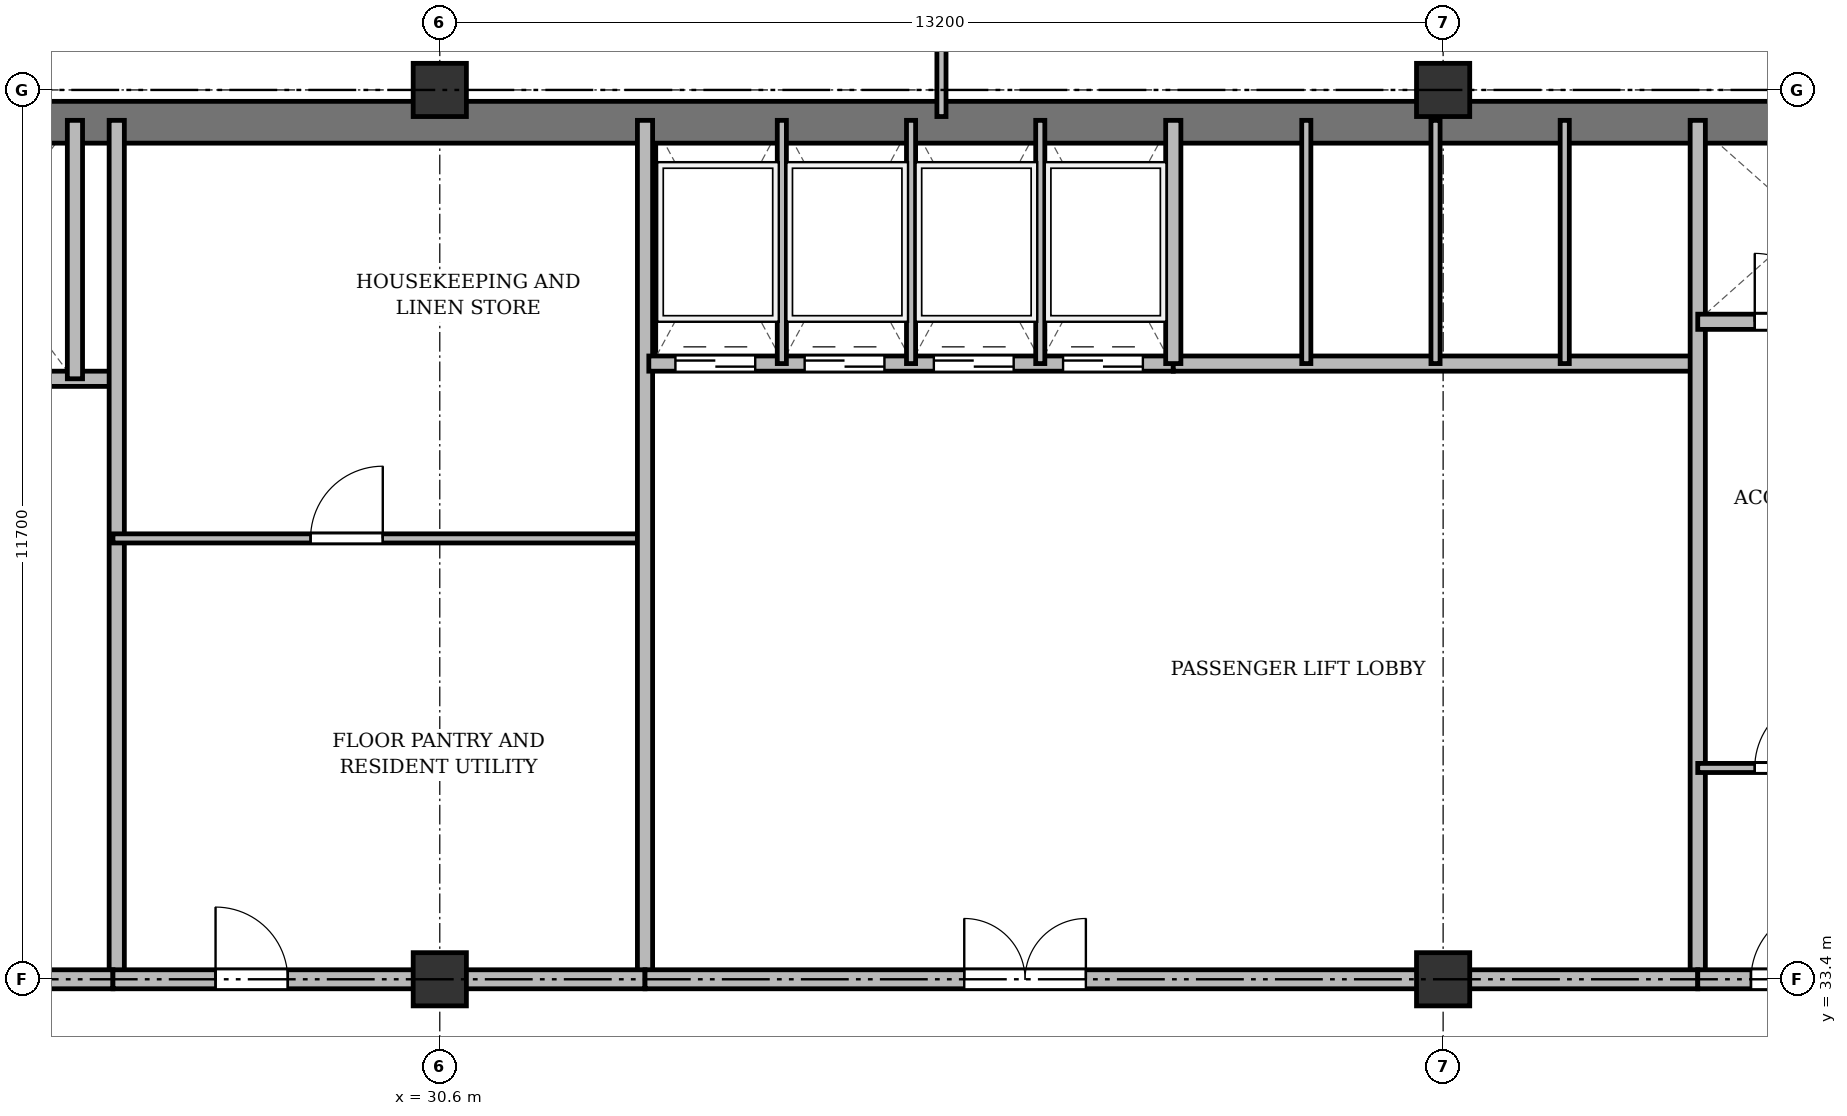
"""IFC4 building model, lengths in metres.
Left out: names, types, materials, properties, quantities, classifications, styles, units other than length and angle.
Written with IfcOpenShell. Run it as: python <this file> out.ifc"""

import sys

from ifc_helpers import new_model, si_unit, direction, frame, frame_2d, origin, origin_2d, place, context, subcontext, project, spatial, rectangle, extrude, source, transform, mapped, element, fill, save


model = new_model("IFC4")
c1 = context("Model", 3, precision=1e-05, world=origin(), true_north=direction((0.0, 1.0)))
c2 = subcontext(c1, "Body", "Model", "MODEL_VIEW")
j1 = project(units=[si_unit("LENGTHUNIT", "METRE"), si_unit("PLANEANGLEUNIT", "RADIAN")], contexts=[c1])
p1 = place(None, origin())
s1 = spatial("IfcSite", under=j1, at=p1, CompositionType="ELEMENT")
p2 = place(p1, origin())
s2 = spatial("IfcBuilding", under=s1, at=p2, CompositionType="ELEMENT")
p3 = place(p2, frame((0.0, 0.0, 168.1)))
s3 = spatial("IfcBuildingStorey", under=s2, at=p3, CompositionType="ELEMENT", Elevation=168.1)
m1 = source(origin(), c2, "Body", "SweptSolid", [
    extrude(rectangle(XDim=0.7, YDim=0.7, at=origin_2d()), origin(), (0.0, 0.0, 1.0), 3.6),
])
for number, where, z_axis, x_axis in (
    (1, (30.6, 33.4, 0.0), (0.0, 0.0, 1.0), (1.0, 0.0, 0.0)),
    (2, (30.6, 45.1, 0.0), (0.0, 0.0, 1.0), (1.0, 0.0, 0.0)),
    (3, (43.8, 33.4, 0.0), (0.0, 0.0, 1.0), (1.0, 0.0, 0.0)),
    (4, (43.8, 45.1, 0.0), (0.0, 0.0, 1.0), (1.0, 0.0, 0.0)),
):
    element("IfcColumn", number, at=place(p3, frame(where, z_axis=z_axis, x_axis=x_axis)), inside=s3, PredefinedType="COLUMN", context=c2, shape_type="MappedRepresentation", body=[
        mapped(m1, transform((0.0, 0.0, 0.0), x_axis=(1.0, 0.0, 0.0), y_axis=(0.0, 1.0, 0.0), z_axis=(0.0, 0.0, 1.0), scale=1.0)),
    ])
p4 = place(p3, frame((15.65, 44.675, 0.0), z_axis=(0.0, 0.0, 1.0), x_axis=(1.0, 0.0, 0.0)))
e5 = element("IfcWall", 5, at=p4, inside=s3, PredefinedType="SHEAR", context=c2, shape_type="SweptSolid", body=[
    extrude(rectangle(XDim=43.1, YDim=0.55, at=frame_2d((21.55, 0.0))), origin(), (0.0, 0.0, 1.0), 3.35),
])
p5 = place(p3, frame((19.55, 41.3, 0.0), z_axis=(0.0, 0.0, 1.0), x_axis=(1.0, 0.0, 0.0)))
e6 = element("IfcWall", 6, at=p5, inside=s3, PredefinedType="SOLIDWALL", context=c2, shape_type="SweptSolid", body=[
    extrude(rectangle(XDim=6.75, YDim=0.2, at=frame_2d((3.375, 0.0))), origin(), (0.0, 0.0, 1.0), 3.35),
])
p6 = place(p5, frame((1.7, 0.0, 0.0)))
e7 = element("IfcOpeningElement", 7, at=p6, cuts=e6, PredefinedType="OPENING", context=c2, shape_type="SweptSolid", body=[
    extrude(rectangle(XDim=1.1, YDim=2.15, at=frame_2d((0.55, 1.075))), frame((0.0, 0.11, 0.0), z_axis=(0.0, -1.0, 0.0), x_axis=(1.0, 0.0, 0.0)), (0.0, 0.0, 1.0), 0.22),
])
p7 = place(p5, frame((4.4, 0.0, 0.0)))
e8 = element("IfcOpeningElement", 8, at=p7, cuts=e6, PredefinedType="OPENING", context=c2, shape_type="SweptSolid", body=[
    extrude(rectangle(XDim=1.1, YDim=2.15, at=frame_2d((0.55, 1.075))), frame((0.0, 0.11, 0.0), z_axis=(0.0, -1.0, 0.0), x_axis=(1.0, 0.0, 0.0)), (0.0, 0.0, 1.0), 0.22),
])
p8 = place(p3, frame((25.8, 41.3, 0.0), z_axis=(0.0, 0.0, 1.0), x_axis=(0.0, 1.0, 0.0)))
e9 = element("IfcWall", 9, at=p8, inside=s3, PredefinedType="SOLIDWALL", context=c2, shape_type="SweptSolid", body=[
    extrude(rectangle(XDim=3.4, YDim=0.2, at=frame_2d((1.7, 0.0))), origin(), (0.0, 0.0, 1.0), 3.35),
])
p9 = place(p3, frame((26.35, 33.4, 0.0), z_axis=(0.0, 0.0, 1.0), x_axis=(0.0, 1.0, 0.0)))
e10 = element("IfcWall", 10, at=p9, inside=s3, PredefinedType="SOLIDWALL", context=c2, shape_type="SweptSolid", body=[
    extrude(rectangle(XDim=11.3, YDim=0.2, at=frame_2d((5.65, 0.0))), origin(), (0.0, 0.0, 1.0), 2.75),
])
p10 = place(p3, frame((19.5, 33.4, 0.0), z_axis=(0.0, 0.0, 1.0), x_axis=(1.0, 0.0, 0.0)))
e11 = element("IfcWall", 11, at=p10, inside=s3, PredefinedType="PARTITIONING", context=c2, shape_type="SweptSolid", body=[
    extrude(rectangle(XDim=6.8, YDim=0.25, at=frame_2d((3.4, 0.0))), origin(), (0.0, 0.0, 1.0), 2.75),
])
p11 = place(p10, frame((0.75, 0.0, 0.0)))
e12 = element("IfcOpeningElement", 12, at=p11, cuts=e11, PredefinedType="OPENING", context=c2, shape_type="SweptSolid", body=[
    extrude(rectangle(XDim=1.6, YDim=2.2, at=frame_2d((0.8, 1.1))), frame((0.0, 0.135, 0.0), z_axis=(0.0, -1.0, 0.0), x_axis=(1.0, 0.0, 0.0)), (0.0, 0.0, 1.0), 0.27),
])
p12 = place(p3, frame((26.3, 39.2, 0.0), z_axis=(0.0, 0.0, 1.0), x_axis=(1.0, 0.0, 0.0)))
e13 = element("IfcWall", 13, at=p12, inside=s3, PredefinedType="PARTITIONING", context=c2, shape_type="SweptSolid", body=[
    extrude(rectangle(XDim=7.0, YDim=0.12, at=frame_2d((3.5, 0.0))), origin(), (0.0, 0.0, 1.0), 2.85),
])
p13 = place(p12, frame((2.6, 0.0, 0.0)))
e14 = element("IfcOpeningElement", 14, at=p13, cuts=e13, PredefinedType="OPENING", context=c2, shape_type="SweptSolid", body=[
    extrude(rectangle(XDim=0.95, YDim=2.15, at=frame_2d((0.475, 1.075))), frame((0.0, 0.07, 0.0), z_axis=(0.0, -1.0, 0.0), x_axis=(1.0, 0.0, 0.0)), (0.0, 0.0, 1.0), 0.14),
])
p14 = place(p3, frame((33.3, 33.4, 0.0), z_axis=(0.0, 0.0, 1.0), x_axis=(0.0, 1.0, 0.0)))
e15 = element("IfcWall", 15, at=p14, inside=s3, PredefinedType="SOLIDWALL", context=c2, shape_type="SweptSolid", body=[
    extrude(rectangle(XDim=11.3, YDim=0.2, at=frame_2d((5.65, 0.0))), origin(), (0.0, 0.0, 1.0), 2.75),
])
p15 = place(p3, frame((33.35, 41.5, 0.0), z_axis=(0.0, 0.0, 1.0), x_axis=(1.0, 0.0, 0.0)))
e16 = element("IfcWall", 16, at=p15, inside=s3, PredefinedType="SOLIDWALL", context=c2, shape_type="SweptSolid", body=[
    extrude(rectangle(XDim=6.9, YDim=0.2, at=frame_2d((3.45, 0.0))), origin(), (0.0, 0.0, 1.0), 3.35),
])
p16 = place(p15, frame((0.35, 0.0, 0.0)))
e17 = element("IfcOpeningElement", 17, at=p16, cuts=e16, PredefinedType="OPENING", context=c2, shape_type="SweptSolid", body=[
    extrude(rectangle(XDim=1.05, YDim=2.15, at=frame_2d((0.525, 1.075))), frame((0.0, 0.11, 0.0), z_axis=(0.0, -1.0, 0.0), x_axis=(1.0, 0.0, 0.0)), (0.0, 0.0, 1.0), 0.22),
])
p17 = place(p15, frame((2.05, 0.0, 0.0)))
e18 = element("IfcOpeningElement", 18, at=p17, cuts=e16, PredefinedType="OPENING", context=c2, shape_type="SweptSolid", body=[
    extrude(rectangle(XDim=1.05, YDim=2.15, at=frame_2d((0.525, 1.075))), frame((0.0, 0.11, 0.0), z_axis=(0.0, -1.0, 0.0), x_axis=(1.0, 0.0, 0.0)), (0.0, 0.0, 1.0), 0.22),
])
p18 = place(p15, frame((3.75, 0.0, 0.0)))
e19 = element("IfcOpeningElement", 19, at=p18, cuts=e16, PredefinedType="OPENING", context=c2, shape_type="SweptSolid", body=[
    extrude(rectangle(XDim=1.05, YDim=2.15, at=frame_2d((0.525, 1.075))), frame((0.0, 0.11, 0.0), z_axis=(0.0, -1.0, 0.0), x_axis=(1.0, 0.0, 0.0)), (0.0, 0.0, 1.0), 0.22),
])
p19 = place(p15, frame((5.45, 0.0, 0.0)))
e20 = element("IfcOpeningElement", 20, at=p19, cuts=e16, PredefinedType="OPENING", context=c2, shape_type="SweptSolid", body=[
    extrude(rectangle(XDim=1.05, YDim=2.15, at=frame_2d((0.525, 1.075))), frame((0.0, 0.11, 0.0), z_axis=(0.0, -1.0, 0.0), x_axis=(1.0, 0.0, 0.0)), (0.0, 0.0, 1.0), 0.22),
])
for number, where, z_axis, x_axis in (
    (21, (35.1, 41.5, 0.0), (0.0, 0.0, 1.0), (0.0, 1.0, 0.0)),
    (22, (36.8, 41.5, 0.0), (0.0, 0.0, 1.0), (0.0, 1.0, 0.0)),
    (23, (38.5, 41.5, 0.0), (0.0, 0.0, 1.0), (0.0, 1.0, 0.0)),
):
    element("IfcWall", number, at=place(p3, frame(where, z_axis=z_axis, x_axis=x_axis)), inside=s3, PredefinedType="PARTITIONING", context=c2, shape_type="SweptSolid", body=[
        extrude(rectangle(XDim=3.2, YDim=0.12, at=frame_2d((1.6, 0.0))), origin(), (0.0, 0.0, 1.0), 3.35),
    ])
p20 = place(p3, frame((40.25, 41.5, 0.0), z_axis=(0.0, 0.0, 1.0), x_axis=(1.0, 0.0, 0.0)))
e24 = element("IfcWall", 24, at=p20, inside=s3, PredefinedType="SOLIDWALL", context=c2, shape_type="SweptSolid", body=[
    extrude(rectangle(XDim=6.9, YDim=0.2, at=frame_2d((3.45, 0.0))), origin(), (0.0, 0.0, 1.0), 2.85),
])
p21 = place(p3, frame((40.25, 41.5, 0.0), z_axis=(0.0, 0.0, 1.0), x_axis=(0.0, 1.0, 0.0)))
e25 = element("IfcWall", 25, at=p21, inside=s3, PredefinedType="SOLIDWALL", context=c2, shape_type="SweptSolid", body=[
    extrude(rectangle(XDim=3.2, YDim=0.2, at=frame_2d((1.6, 0.0))), origin(), (0.0, 0.0, 1.0), 3.35),
])
p22 = place(p3, frame((42.0, 41.5, 0.0), z_axis=(0.0, 0.0, 1.0), x_axis=(0.0, 1.0, 0.0)))
e26 = element("IfcWall", 26, at=p22, inside=s3, PredefinedType="PARTITIONING", context=c2, shape_type="SweptSolid", body=[
    extrude(rectangle(XDim=3.2, YDim=0.12, at=frame_2d((1.6, 0.0))), origin(), (0.0, 0.0, 1.0), 3.35),
])
p23 = place(p3, frame((43.7, 41.5, 0.0), z_axis=(0.0, 0.0, 1.0), x_axis=(0.0, 1.0, 0.0)))
e27 = element("IfcWall", 27, at=p23, inside=s3, PredefinedType="PARTITIONING", context=c2, shape_type="SweptSolid", body=[
    extrude(rectangle(XDim=3.2, YDim=0.12, at=frame_2d((1.6, 0.0))), origin(), (0.0, 0.0, 1.0), 2.85),
])
p24 = place(p3, frame((45.4, 41.5, 0.0), z_axis=(0.0, 0.0, 1.0), x_axis=(0.0, 1.0, 0.0)))
e28 = element("IfcWall", 28, at=p24, inside=s3, PredefinedType="PARTITIONING", context=c2, shape_type="SweptSolid", body=[
    extrude(rectangle(XDim=3.2, YDim=0.12, at=frame_2d((1.6, 0.0))), origin(), (0.0, 0.0, 1.0), 3.35),
])
p25 = place(p3, frame((47.15, 33.4, 0.0), z_axis=(0.0, 0.0, 1.0), x_axis=(0.0, 1.0, 0.0)))
e29 = element("IfcWall", 29, at=p25, inside=s3, PredefinedType="SOLIDWALL", context=c2, shape_type="SweptSolid", body=[
    extrude(rectangle(XDim=11.3, YDim=0.2, at=frame_2d((5.65, 0.0))), origin(), (0.0, 0.0, 1.0), 2.75),
])
p26 = place(p3, frame((26.3, 33.4, 0.0), z_axis=(0.0, 0.0, 1.0), x_axis=(1.0, 0.0, 0.0)))
e30 = element("IfcWall", 30, at=p26, inside=s3, PredefinedType="PARTITIONING", context=c2, shape_type="SweptSolid", body=[
    extrude(rectangle(XDim=7.0, YDim=0.25, at=frame_2d((3.5, 0.0))), origin(), (0.0, 0.0, 1.0), 2.75),
])
p27 = place(p26, frame((1.35, 0.0, 0.0)))
e31 = element("IfcOpeningElement", 31, at=p27, cuts=e30, PredefinedType="OPENING", context=c2, shape_type="SweptSolid", body=[
    extrude(rectangle(XDim=0.95, YDim=2.15, at=frame_2d((0.475, 1.075))), frame((0.0, 0.135, 0.0), z_axis=(0.0, -1.0, 0.0), x_axis=(1.0, 0.0, 0.0)), (0.0, 0.0, 1.0), 0.27),
])
p28 = place(p3, frame((33.3, 33.4, 0.0), z_axis=(0.0, 0.0, 1.0), x_axis=(1.0, 0.0, 0.0)))
e32 = element("IfcWall", 32, at=p28, inside=s3, PredefinedType="PARTITIONING", context=c2, shape_type="SweptSolid", body=[
    extrude(rectangle(XDim=13.85, YDim=0.25, at=frame_2d((6.925, 0.0))), origin(), (0.0, 0.0, 1.0), 2.75),
])
p29 = place(p28, frame((4.2, 0.0, 0.0)))
e33 = element("IfcOpeningElement", 33, at=p29, cuts=e32, PredefinedType="OPENING", context=c2, shape_type="SweptSolid", body=[
    extrude(rectangle(XDim=1.6, YDim=2.2, at=frame_2d((0.8, 1.1))), frame((0.0, 0.135, 0.0), z_axis=(0.0, -1.0, 0.0), x_axis=(1.0, 0.0, 0.0)), (0.0, 0.0, 1.0), 0.27),
])
p30 = place(p3, frame((47.15, 42.05, 0.0), z_axis=(0.0, 0.0, 1.0), x_axis=(1.0, 0.0, 0.0)))
e34 = element("IfcWall", 34, at=p30, inside=s3, PredefinedType="SOLIDWALL", context=c2, shape_type="SweptSolid", body=[
    extrude(rectangle(XDim=7.85, YDim=0.2, at=frame_2d((3.925, 0.0))), origin(), (0.0, 0.0, 1.0), 2.85),
])
p31 = place(p30, frame((0.75, 0.0, 0.0)))
e35 = element("IfcOpeningElement", 35, at=p31, cuts=e34, PredefinedType="OPENING", context=c2, shape_type="SweptSolid", body=[
    extrude(rectangle(XDim=0.9, YDim=2.1, at=frame_2d((0.45, 1.05))), frame((0.0, 0.11, 0.0), z_axis=(0.0, -1.0, 0.0), x_axis=(1.0, 0.0, 0.0)), (0.0, 0.0, 1.0), 0.22),
])
p32 = place(p30, frame((3.85, 0.0, 0.0)))
e36 = element("IfcOpeningElement", 36, at=p32, cuts=e34, PredefinedType="OPENING", context=c2, shape_type="SweptSolid", body=[
    extrude(rectangle(XDim=0.9, YDim=2.1, at=frame_2d((0.45, 1.05))), frame((0.0, 0.11, 0.0), z_axis=(0.0, -1.0, 0.0), x_axis=(1.0, 0.0, 0.0)), (0.0, 0.0, 1.0), 0.22),
])
p33 = place(p3, frame((47.15, 36.18, 0.0), z_axis=(0.0, 0.0, 1.0), x_axis=(1.0, 0.0, 0.0)))
e37 = element("IfcWall", 37, at=p33, inside=s3, PredefinedType="PARTITIONING", context=c2, shape_type="SweptSolid", body=[
    extrude(rectangle(XDim=5.3, YDim=0.12, at=frame_2d((2.65, 0.0))), origin(), (0.0, 0.0, 1.0), 2.85),
])
p34 = place(p33, frame((0.75, 0.0, 0.0)))
e38 = element("IfcOpeningElement", 38, at=p34, cuts=e37, PredefinedType="OPENING", context=c2, shape_type="SweptSolid", body=[
    extrude(rectangle(XDim=0.95, YDim=2.15, at=frame_2d((0.475, 1.075))), frame((0.0, 0.07, 0.0), z_axis=(0.0, -1.0, 0.0), x_axis=(1.0, 0.0, 0.0)), (0.0, 0.0, 1.0), 0.14),
])
p35 = place(p33, frame((3.45, 0.0, 0.0)))
e39 = element("IfcOpeningElement", 39, at=p35, cuts=e37, PredefinedType="OPENING", context=c2, shape_type="SweptSolid", body=[
    extrude(rectangle(XDim=0.95, YDim=2.15, at=frame_2d((0.475, 1.075))), frame((0.0, 0.07, 0.0), z_axis=(0.0, -1.0, 0.0), x_axis=(1.0, 0.0, 0.0)), (0.0, 0.0, 1.0), 0.14),
])
p36 = place(p3, frame((47.15, 33.4, 0.0), z_axis=(0.0, 0.0, 1.0), x_axis=(1.0, 0.0, 0.0)))
e40 = element("IfcWall", 40, at=p36, inside=s3, PredefinedType="PARTITIONING", context=c2, shape_type="SweptSolid", body=[
    extrude(rectangle(XDim=11.15, YDim=0.25, at=frame_2d((5.575, 0.0))), origin(), (0.0, 0.0, 1.0), 2.75),
])
p37 = place(p36, frame((0.7, 0.0, 0.0)))
e41 = element("IfcOpeningElement", 41, at=p37, cuts=e40, PredefinedType="OPENING", context=c2, shape_type="SweptSolid", body=[
    extrude(rectangle(XDim=0.95, YDim=2.15, at=frame_2d((0.475, 1.075))), frame((0.0, 0.135, 0.0), z_axis=(0.0, -1.0, 0.0), x_axis=(1.0, 0.0, 0.0)), (0.0, 0.0, 1.0), 0.27),
])
p38 = place(p36, frame((6.0, 0.0, 0.0)))
e42 = element("IfcOpeningElement", 42, at=p38, cuts=e40, PredefinedType="OPENING", context=c2, shape_type="SweptSolid", body=[
    extrude(rectangle(XDim=1.2, YDim=2.15, at=frame_2d((0.6, 1.075))), frame((0.0, 0.135, 0.0), z_axis=(0.0, -1.0, 0.0), x_axis=(1.0, 0.0, 0.0)), (0.0, 0.0, 1.0), 0.27),
])
p39 = place(p3, frame((37.2, 44.75, 0.0), z_axis=(0.0, 0.0, 1.0), x_axis=(0.0, 1.0, 0.0)))
e43 = element("IfcWall", 43, at=p39, inside=s3, PredefinedType="PARTITIONING", context=c2, shape_type="SweptSolid", body=[
    extrude(rectangle(XDim=3.61, YDim=0.12, at=frame_2d((1.805, 0.0))), origin(), (0.0, 0.0, 1.0), 2.75),
])
p40 = place(p39, frame((1.1, 0.0, 0.0)))
e44 = element("IfcOpeningElement", 44, at=p40, cuts=e43, PredefinedType="OPENING", context=c2, shape_type="SweptSolid", body=[
    extrude(rectangle(XDim=0.95, YDim=2.15, at=frame_2d((0.475, 1.075))), frame((0.0, 0.07, 0.0), z_axis=(0.0, -1.0, 0.0), x_axis=(1.0, 0.0, 0.0)), (0.0, 0.0, 1.0), 0.14),
])
m2 = source(origin(), c2, "Body", "SweptSolid", [
    extrude(rectangle(XDim=0.95, YDim=2.15, at=frame_2d((0.475, 1.075))), frame((0.0, 0.025, 0.0), z_axis=(0.0, -1.0, 0.0), x_axis=(1.0, 0.0, 0.0)), (0.0, 0.0, 1.0), 0.05),
])
p41 = place(p13, origin())
e45 = element("IfcDoor", 45, at=p41, inside=s3, OperationType="SINGLE_SWING_RIGHT", PredefinedType="DOOR", context=c2, shape_type="MappedRepresentation", body=[
    mapped(m2, transform((0.0, 0.0, 0.0), x_axis=(1.0, 0.0, 0.0), y_axis=(0.0, 1.0, 0.0), z_axis=(0.0, 0.0, 1.0), scale=1.0)),
])
fill(e14, e45)
m3 = source(origin(), c2, "Body", "SweptSolid", [
    extrude(rectangle(XDim=1.05, YDim=2.15, at=frame_2d((0.525, 1.075))), frame((0.0, 0.025, 0.0), z_axis=(0.0, -1.0, 0.0), x_axis=(1.0, 0.0, 0.0)), (0.0, 0.0, 1.0), 0.05),
])
p42 = place(p16, origin())
e46 = element("IfcDoor", 46, at=p42, inside=s3, OperationType="DOUBLE_DOOR_SLIDING", PredefinedType="DOOR", context=c2, shape_type="MappedRepresentation", body=[
    mapped(m3, transform((0.0, 0.0, 0.0), x_axis=(1.0, 0.0, 0.0), y_axis=(0.0, 1.0, 0.0), z_axis=(0.0, 0.0, 1.0), scale=1.0)),
])
fill(e17, e46)
p43 = place(p17, origin())
e47 = element("IfcDoor", 47, at=p43, inside=s3, OperationType="DOUBLE_DOOR_SLIDING", PredefinedType="DOOR", context=c2, shape_type="MappedRepresentation", body=[
    mapped(m3, transform((0.0, 0.0, 0.0), x_axis=(1.0, 0.0, 0.0), y_axis=(0.0, 1.0, 0.0), z_axis=(0.0, 0.0, 1.0), scale=1.0)),
])
fill(e18, e47)
p44 = place(p18, origin())
e48 = element("IfcDoor", 48, at=p44, inside=s3, OperationType="DOUBLE_DOOR_SLIDING", PredefinedType="DOOR", context=c2, shape_type="MappedRepresentation", body=[
    mapped(m3, transform((0.0, 0.0, 0.0), x_axis=(1.0, 0.0, 0.0), y_axis=(0.0, 1.0, 0.0), z_axis=(0.0, 0.0, 1.0), scale=1.0)),
])
fill(e19, e48)
p45 = place(p19, origin())
e49 = element("IfcDoor", 49, at=p45, inside=s3, OperationType="DOUBLE_DOOR_SLIDING", PredefinedType="DOOR", context=c2, shape_type="MappedRepresentation", body=[
    mapped(m3, transform((0.0, 0.0, 0.0), x_axis=(1.0, 0.0, 0.0), y_axis=(0.0, 1.0, 0.0), z_axis=(0.0, 0.0, 1.0), scale=1.0)),
])
fill(e20, e49)
p46 = place(p27, origin())
e50 = element("IfcDoor", 50, at=p46, inside=s3, OperationType="SINGLE_SWING_LEFT", PredefinedType="DOOR", context=c2, shape_type="MappedRepresentation", body=[
    mapped(m2, transform((0.0, 0.0, 0.0), x_axis=(1.0, 0.0, 0.0), y_axis=(0.0, 1.0, 0.0), z_axis=(0.0, 0.0, 1.0), scale=1.0)),
])
fill(e31, e50)
m4 = source(origin(), c2, "Body", "SweptSolid", [
    extrude(rectangle(XDim=1.6, YDim=2.2, at=frame_2d((0.8, 1.1))), frame((0.0, 0.025, 0.0), z_axis=(0.0, -1.0, 0.0), x_axis=(1.0, 0.0, 0.0)), (0.0, 0.0, 1.0), 0.05),
])
p47 = place(p29, origin())
e51 = element("IfcDoor", 51, at=p47, inside=s3, OperationType="DOUBLE_DOOR_SINGLE_SWING", PredefinedType="DOOR", context=c2, shape_type="MappedRepresentation", body=[
    mapped(m4, transform((0.0, 0.0, 0.0), x_axis=(1.0, 0.0, 0.0), y_axis=(0.0, 1.0, 0.0), z_axis=(0.0, 0.0, 1.0), scale=1.0)),
])
fill(e33, e51)
m5 = source(origin(), c2, "Body", "SweptSolid", [
    extrude(rectangle(XDim=0.9, YDim=2.1, at=frame_2d((0.45, 1.05))), frame((0.0, 0.025, 0.0), z_axis=(0.0, -1.0, 0.0), x_axis=(1.0, 0.0, 0.0)), (0.0, 0.0, 1.0), 0.05),
])
p48 = place(p31, origin())
e52 = element("IfcDoor", 52, at=p48, inside=s3, OperationType="SINGLE_SWING_LEFT", PredefinedType="DOOR", context=c2, shape_type="MappedRepresentation", body=[
    mapped(m5, transform((0.0, 0.0, 0.0), x_axis=(1.0, 0.0, 0.0), y_axis=(0.0, 1.0, 0.0), z_axis=(0.0, 0.0, 1.0), scale=1.0)),
])
fill(e35, e52)
p49 = place(p34, origin())
e53 = element("IfcDoor", 53, at=p49, inside=s3, OperationType="SINGLE_SWING_RIGHT", PredefinedType="DOOR", context=c2, shape_type="MappedRepresentation", body=[
    mapped(m2, transform((0.0, 0.0, 0.0), x_axis=(1.0, 0.0, 0.0), y_axis=(0.0, 1.0, 0.0), z_axis=(0.0, 0.0, 1.0), scale=1.0)),
])
fill(e38, e53)
p50 = place(p37, origin())
e54 = element("IfcDoor", 54, at=p50, inside=s3, OperationType="SINGLE_SWING_RIGHT", PredefinedType="DOOR", context=c2, shape_type="MappedRepresentation", body=[
    mapped(m2, transform((0.0, 0.0, 0.0), x_axis=(1.0, 0.0, 0.0), y_axis=(0.0, 1.0, 0.0), z_axis=(0.0, 0.0, 1.0), scale=1.0)),
])
fill(e41, e54)
save(model, sys.argv[1])
